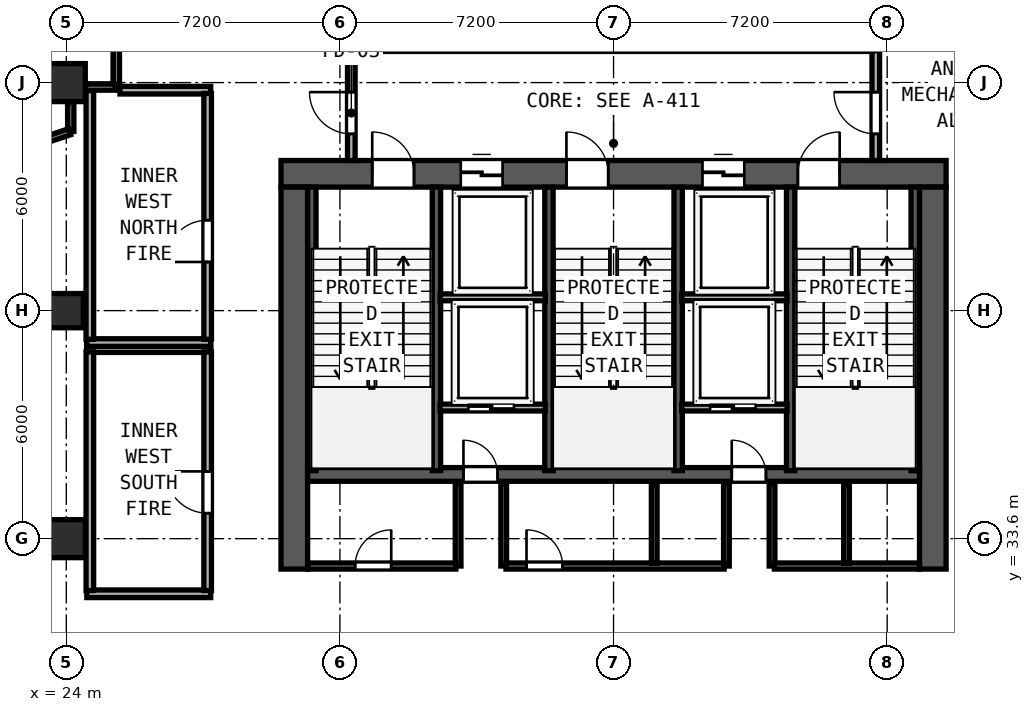
"""IFC4 building model, lengths in metres.
Left out: names, types, materials, properties, quantities, classifications, styles, units other than length and angle.
Written with IfcOpenShell. Run it as: python <this file> out.ifc"""

import sys

from ifc_helpers import new_model, si_unit, direction, frame, frame_2d, origin, origin_2d, place, context, subcontext, project, spatial, rectangle, hollow_rectangle, extrude, element, fill, save


model = new_model("IFC4")
c1 = context("Model", 3, precision=1e-05, world=origin(), true_north=direction((0.0, 1.0)))
c2 = subcontext(c1, "Body", "Model", "MODEL_VIEW")
j1 = project(units=[si_unit("LENGTHUNIT", "METRE"), si_unit("PLANEANGLEUNIT", "RADIAN")], contexts=[c1])
p1 = place(None, origin())
s1 = spatial("IfcSite", under=j1, at=p1, CompositionType="ELEMENT")
p2 = place(p1, origin())
s2 = spatial("IfcBuilding", under=s1, at=p2, CompositionType="ELEMENT")
p3 = place(p2, frame((0.0, 0.0, 136.4)))
s3 = spatial("IfcBuildingStorey", under=s2, at=p3, CompositionType="ELEMENT", Elevation=136.4)
p4 = place(p3, frame((29.65, 43.2, 0.0), z_axis=(0.0, 0.0, 1.0), x_axis=(1.0, 0.0, 0.0)))
e1 = element("IfcWall", 1, at=p4, inside=s3, PredefinedType="SHEAR", context=c2, shape_type="SweptSolid", body=[
    extrude(rectangle(XDim=17.5, YDim=0.7, at=frame_2d((8.75, 0.0))), origin(), (0.0, 0.0, 1.0), 4.4),
])
p5 = place(p4, frame((2.4, 0.0, 0.0)))
e2 = element("IfcOpeningElement", 2, at=p5, cuts=e1, PredefinedType="OPENING", context=c2, shape_type="SweptSolid", body=[
    extrude(rectangle(XDim=1.1, YDim=2.15, at=frame_2d((0.55, 1.075))), frame((0.0, 0.36, 0.0), z_axis=(0.0, -1.0, 0.0), x_axis=(1.0, 0.0, 0.0)), (0.0, 0.0, 1.0), 0.72),
])
p6 = place(p4, frame((7.51, 0.0, 0.0)))
e3 = element("IfcOpeningElement", 3, at=p6, cuts=e1, PredefinedType="OPENING", context=c2, shape_type="SweptSolid", body=[
    extrude(rectangle(XDim=1.1, YDim=2.15, at=frame_2d((0.55, 1.075))), frame((0.0, 0.36, 0.0), z_axis=(0.0, -1.0, 0.0), x_axis=(1.0, 0.0, 0.0)), (0.0, 0.0, 1.0), 0.72),
])
p7 = place(p4, frame((13.6, 0.0, 0.0)))
e4 = element("IfcOpeningElement", 4, at=p7, cuts=e1, PredefinedType="OPENING", context=c2, shape_type="SweptSolid", body=[
    extrude(rectangle(XDim=1.1, YDim=2.15, at=frame_2d((0.55, 1.075))), frame((0.0, 0.36, 0.0), z_axis=(0.0, -1.0, 0.0), x_axis=(1.0, 0.0, 0.0)), (0.0, 0.0, 1.0), 0.72),
])
p8 = place(p4, frame((4.73, 0.0, 0.0)))
e5 = element("IfcOpeningElement", 5, at=p8, cuts=e1, PredefinedType="OPENING", context=c2, shape_type="SweptSolid", body=[
    extrude(rectangle(XDim=1.1, YDim=2.2, at=frame_2d((0.55, 1.1))), frame((0.0, 0.36, 0.0), z_axis=(0.0, -1.0, 0.0), x_axis=(1.0, 0.0, 0.0)), (0.0, 0.0, 1.0), 0.72),
])
p9 = place(p4, frame((11.09, 0.0, 0.0)))
e6 = element("IfcOpeningElement", 6, at=p9, cuts=e1, PredefinedType="OPENING", context=c2, shape_type="SweptSolid", body=[
    extrude(rectangle(XDim=1.1, YDim=2.2, at=frame_2d((0.55, 1.1))), frame((0.0, 0.36, 0.0), z_axis=(0.0, -1.0, 0.0), x_axis=(1.0, 0.0, 0.0)), (0.0, 0.0, 1.0), 0.72),
])
for number, where, z_axis, x_axis in (
    (7, (30.0, 32.8, 0.0), (0.0, 0.0, 1.0), (0.0, 1.0, 0.0)),
    (8, (46.8, 32.8, 0.0), (0.0, 0.0, 1.0), (0.0, 1.0, 0.0)),
):
    element("IfcWall", number, at=place(p3, frame(where, z_axis=z_axis, x_axis=x_axis)), inside=s3, PredefinedType="SHEAR", context=c2, shape_type="SweptSolid", body=[
        extrude(rectangle(XDim=10.05, YDim=0.7, at=frame_2d((5.025, 0.0))), origin(), (0.0, 0.0, 1.0), 4.4),
    ])
p10 = place(p3, frame((30.35, 35.29, 0.0), z_axis=(0.0, 0.0, 1.0), x_axis=(1.0, 0.0, 0.0)))
e9 = element("IfcWall", 9, at=p10, inside=s3, PredefinedType="SHEAR", context=c2, shape_type="SweptSolid", body=[
    extrude(rectangle(XDim=16.1, YDim=0.36, at=frame_2d((8.05, 0.0))), origin(), (0.0, 0.0, 1.0), 4.4),
])
p11 = place(p10, frame((5.0, 0.0, 0.0), z_axis=(0.0, 0.0, 1.0), x_axis=(-1.0, 0.0, 0.0)))
e10 = element("IfcOpeningElement", 10, at=p11, cuts=e9, PredefinedType="OPENING", context=c2, shape_type="SweptSolid", body=[
    extrude(rectangle(XDim=0.9, YDim=2.1, at=frame_2d((0.45, 1.05))), frame((0.0, 0.19, 0.0), z_axis=(0.0, -1.0, 0.0), x_axis=(1.0, 0.0, 0.0)), (0.0, 0.0, 1.0), 0.38),
])
p12 = place(p10, frame((12.06, 0.0, 0.0), z_axis=(0.0, 0.0, 1.0), x_axis=(-1.0, 0.0, 0.0)))
e11 = element("IfcOpeningElement", 11, at=p12, cuts=e9, PredefinedType="OPENING", context=c2, shape_type="SweptSolid", body=[
    extrude(rectangle(XDim=0.9, YDim=2.1, at=frame_2d((0.45, 1.05))), frame((0.0, 0.19, 0.0), z_axis=(0.0, -1.0, 0.0), x_axis=(1.0, 0.0, 0.0)), (0.0, 0.0, 1.0), 0.38),
])
for number, where, z_axis, x_axis in (
    (12, (30.462, 35.39, 0.0), (0.0, 0.0, 1.0), (0.0, 1.0, 0.0)),
    (13, (33.74, 35.39, 0.0), (0.0, 0.0, 1.0), (0.0, 1.0, 0.0)),
    (14, (36.7, 35.39, 0.0), (0.0, 0.0, 1.0), (0.0, 1.0, 0.0)),
    (15, (40.1, 35.39, 0.0), (0.0, 0.0, 1.0), (0.0, 1.0, 0.0)),
    (16, (43.06, 35.39, 0.0), (0.0, 0.0, 1.0), (0.0, 1.0, 0.0)),
    (17, (46.338, 35.39, 0.0), (0.0, 0.0, 1.0), (0.0, 1.0, 0.0)),
):
    element("IfcWall", number, at=place(p3, frame(where, z_axis=z_axis, x_axis=x_axis)), inside=s3, PredefinedType="SHEAR", context=c2, shape_type="SweptSolid", body=[
        extrude(rectangle(XDim=7.46, YDim=0.22, at=frame_2d((3.73, 0.0))), origin(), (0.0, 0.0, 1.0), 4.4),
    ])
for number, where, z_axis, x_axis in (
    (18, (24.0, 33.6, 0.0), (0.0, 0.0, 1.0), (1.0, 0.0, 0.0)),
    (19, (24.0, 45.6, 0.0), (0.0, 0.0, 1.0), (1.0, 0.0, 0.0)),
):
    element("IfcColumn", number, at=place(p3, frame(where, z_axis=z_axis, x_axis=x_axis)), inside=s3, PredefinedType="COLUMN", context=c2, shape_type="SweptSolid", body=[
        extrude(hollow_rectangle(XDim=1.0, YDim=1.0, WallThickness=0.038, at=origin_2d()), origin(), (0.0, 0.0, 1.0), 4.6),
    ])
p13 = place(p3, frame((24.0, 39.6, 0.0), z_axis=(0.0, 0.0, 1.0), x_axis=(1.0, 0.0, 0.0)))
e20 = element("IfcColumn", 20, at=p13, inside=s3, PredefinedType="COLUMN", context=c2, shape_type="SweptSolid", body=[
    extrude(hollow_rectangle(XDim=0.9, YDim=0.9, WallThickness=0.034, at=origin_2d()), origin(), (0.0, 0.0, 1.0), 4.6),
])
p14 = place(p3, frame((25.32, 46.65, 0.0), z_axis=(0.0, 0.0, 1.0), x_axis=(0.0, -1.0, 0.0)))
e21 = element("IfcWall", 21, at=p14, inside=s3, PredefinedType="PARAPET", context=c2, shape_type="SweptSolid", body=[
    extrude(rectangle(XDim=1.17, YDim=0.16, at=frame_2d((0.585, 0.0))), origin(), (0.0, 0.0, 1.0), 1.15),
])
p15 = place(p3, frame((25.29, 45.48, 0.0), z_axis=(0.0, 0.0, 1.0), x_axis=(-1.0, 0.0, 0.0)))
e22 = element("IfcWall", 22, at=p15, inside=s3, PredefinedType="PARAPET", context=c2, shape_type="SweptSolid", body=[
    extrude(rectangle(XDim=0.798, YDim=0.16, at=frame_2d((0.399, 0.0))), origin(), (0.0, 0.0, 1.0), 1.15),
])
p16 = place(p3, frame((24.12, 45.108, 0.0), z_axis=(0.0, 0.0, 1.0), x_axis=(0.0, -1.0, 0.0)))
e23 = element("IfcWall", 23, at=p16, inside=s3, PredefinedType="PARAPET", context=c2, shape_type="SweptSolid", body=[
    extrude(rectangle(XDim=0.794, YDim=0.16, at=frame_2d((0.397, 0.0))), origin(), (0.0, 0.0, 1.0), 1.15),
])
p17 = place(p3, frame((24.092, 44.304, 0.0), z_axis=(0.0, 0.0, 1.0), x_axis=(-0.948683298051, -0.316227766017, 0.0)))
e24 = element("IfcWall", 24, at=p17, inside=s3, PredefinedType="PARAPET", context=c2, shape_type="SweptSolid", body=[
    extrude(rectangle(XDim=5.888, YDim=0.16, at=frame_2d((2.944, 0.0))), origin(), (0.0, 0.0, 1.0), 1.15),
])
p18 = place(p3, frame((31.5, 43.55, 0.0), z_axis=(0.0, 0.0, 1.0), x_axis=(0.0, 1.0, 0.0)))
e25 = element("IfcWall", 25, at=p18, inside=s3, PredefinedType="SOLIDWALL", context=c2, shape_type="SweptSolid", body=[
    extrude(rectangle(XDim=2.885, YDim=0.2, at=frame_2d((1.442, 0.0))), origin(), (0.0, 0.0, 1.0), 4.4),
])
p19 = place(p18, frame((1.8, 0.0, 0.0), z_axis=(0.0, 0.0, 1.0), x_axis=(-1.0, 0.0, 0.0)))
e26 = element("IfcOpeningElement", 26, at=p19, cuts=e25, PredefinedType="OPENING", context=c2, shape_type="SweptSolid", body=[
    extrude(rectangle(XDim=1.1, YDim=2.15, at=frame_2d((0.55, 1.075))), frame((0.0, 0.11, 0.0), z_axis=(0.0, -1.0, 0.0), x_axis=(1.0, 0.0, 0.0)), (0.0, 0.0, 1.0), 0.22),
])
p20 = place(p3, frame((45.3, 43.55, 0.0), z_axis=(0.0, 0.0, 1.0), x_axis=(0.0, 1.0, 0.0)))
e27 = element("IfcWall", 27, at=p20, inside=s3, PredefinedType="SOLIDWALL", context=c2, shape_type="SweptSolid", body=[
    extrude(rectangle(XDim=2.885, YDim=0.2, at=frame_2d((1.442, 0.0))), origin(), (0.0, 0.0, 1.0), 4.4),
])
p21 = place(p20, frame((0.7, 0.0, 0.0)))
e28 = element("IfcOpeningElement", 28, at=p21, cuts=e27, PredefinedType="OPENING", context=c2, shape_type="SweptSolid", body=[
    extrude(rectangle(XDim=1.1, YDim=2.15, at=frame_2d((0.55, 1.075))), frame((0.0, 0.11, 0.0), z_axis=(0.0, -1.0, 0.0), x_axis=(1.0, 0.0, 0.0)), (0.0, 0.0, 1.0), 0.22),
])
for number, where, z_axis, x_axis in (
    (29, (33.835, 39.95, 0.0), (0.0, 0.0, 1.0), (1.0, 0.0, 0.0)),
    (30, (40.195, 39.95, 0.0), (0.0, 0.0, 1.0), (1.0, 0.0, 0.0)),
):
    element("IfcWall", number, at=place(p3, frame(where, z_axis=z_axis, x_axis=x_axis)), inside=s3, PredefinedType="SOLIDWALL", context=c2, shape_type="SweptSolid", body=[
        extrude(rectangle(XDim=2.77, YDim=0.18, at=frame_2d((1.385, 0.0))), origin(), (0.0, 0.0, 1.0), 4.4),
    ])
p22 = place(p3, frame((33.835, 37.05, 0.0), z_axis=(0.0, 0.0, 1.0), x_axis=(1.0, 0.0, 0.0)))
e31 = element("IfcWall", 31, at=p22, inside=s3, PredefinedType="SOLIDWALL", context=c2, shape_type="SweptSolid", body=[
    extrude(rectangle(XDim=2.77, YDim=0.18, at=frame_2d((1.385, 0.0))), origin(), (0.0, 0.0, 1.0), 4.4),
])
p23 = place(p22, frame((1.945, 0.0, 0.0), z_axis=(0.0, 0.0, 1.0), x_axis=(-1.0, 0.0, 0.0)))
e32 = element("IfcOpeningElement", 32, at=p23, cuts=e31, PredefinedType="OPENING", context=c2, shape_type="SweptSolid", body=[
    extrude(rectangle(XDim=1.2, YDim=2.2, at=frame_2d((0.6, 1.1))), frame((0.0, 0.1, 0.0), z_axis=(0.0, -1.0, 0.0), x_axis=(1.0, 0.0, 0.0)), (0.0, 0.0, 1.0), 0.2),
])
for number, where, z_axis, x_axis in (
    (33, (34.31, 32.88, 0.0), (0.0, 0.0, 1.0), (0.0, 1.0, 0.0)),
    (34, (35.51, 32.88, 0.0), (0.0, 0.0, 1.0), (0.0, 1.0, 0.0)),
):
    element("IfcWall", number, at=place(p3, frame(where, z_axis=z_axis, x_axis=x_axis)), inside=s3, PredefinedType="SOLIDWALL", context=c2, shape_type="SweptSolid", body=[
        extrude(rectangle(XDim=2.17, YDim=0.15, at=frame_2d((1.085, 0.0))), origin(), (0.0, 0.0, 1.0), 4.4),
    ])
p24 = place(p3, frame((40.195, 37.05, 0.0), z_axis=(0.0, 0.0, 1.0), x_axis=(1.0, 0.0, 0.0)))
e35 = element("IfcWall", 35, at=p24, inside=s3, PredefinedType="SOLIDWALL", context=c2, shape_type="SweptSolid", body=[
    extrude(rectangle(XDim=2.77, YDim=0.18, at=frame_2d((1.385, 0.0))), origin(), (0.0, 0.0, 1.0), 4.4),
])
p25 = place(p24, frame((1.945, 0.0, 0.0), z_axis=(0.0, 0.0, 1.0), x_axis=(-1.0, 0.0, 0.0)))
e36 = element("IfcOpeningElement", 36, at=p25, cuts=e35, PredefinedType="OPENING", context=c2, shape_type="SweptSolid", body=[
    extrude(rectangle(XDim=1.2, YDim=2.2, at=frame_2d((0.6, 1.1))), frame((0.0, 0.1, 0.0), z_axis=(0.0, -1.0, 0.0), x_axis=(1.0, 0.0, 0.0)), (0.0, 0.0, 1.0), 0.2),
])
for number, where, z_axis, x_axis in (
    (37, (41.37, 32.88, 0.0), (0.0, 0.0, 1.0), (0.0, 1.0, 0.0)),
    (38, (42.57, 32.88, 0.0), (0.0, 0.0, 1.0), (0.0, 1.0, 0.0)),
):
    element("IfcWall", number, at=place(p3, frame(where, z_axis=z_axis, x_axis=x_axis)), inside=s3, PredefinedType="SOLIDWALL", context=c2, shape_type="SweptSolid", body=[
        extrude(rectangle(XDim=2.17, YDim=0.15, at=frame_2d((1.085, 0.0))), origin(), (0.0, 0.0, 1.0), 4.4),
    ])
p26 = place(p3, frame((30.35, 32.88, 0.0), z_axis=(0.0, 0.0, 1.0), x_axis=(1.0, 0.0, 0.0)))
e39 = element("IfcWall", 39, at=p26, inside=s3, PredefinedType="SOLIDWALL", context=c2, shape_type="SweptSolid", body=[
    extrude(rectangle(XDim=3.9, YDim=0.16, at=frame_2d((1.95, 0.0))), origin(), (0.0, 0.0, 1.0), 4.4),
])
p27 = place(p26, frame((2.2, 0.0, 0.0), z_axis=(0.0, 0.0, 1.0), x_axis=(-1.0, 0.0, 0.0)))
e40 = element("IfcOpeningElement", 40, at=p27, cuts=e39, PredefinedType="OPENING", context=c2, shape_type="SweptSolid", body=[
    extrude(rectangle(XDim=0.95, YDim=2.12, at=frame_2d((0.475, 1.06))), frame((0.0, 0.09, 0.0), z_axis=(0.0, -1.0, 0.0), x_axis=(1.0, 0.0, 0.0)), (0.0, 0.0, 1.0), 0.18),
])
p28 = place(p3, frame((35.57, 32.88, 0.0), z_axis=(0.0, 0.0, 1.0), x_axis=(1.0, 0.0, 0.0)))
e41 = element("IfcWall", 41, at=p28, inside=s3, PredefinedType="SOLIDWALL", context=c2, shape_type="SweptSolid", body=[
    extrude(rectangle(XDim=5.74, YDim=0.16, at=frame_2d((2.87, 0.0))), origin(), (0.0, 0.0, 1.0), 4.4),
])
p29 = place(p28, frame((1.49, 0.0, 0.0), z_axis=(0.0, 0.0, 1.0), x_axis=(-1.0, 0.0, 0.0)))
e42 = element("IfcOpeningElement", 42, at=p29, cuts=e41, PredefinedType="OPENING", context=c2, shape_type="SweptSolid", body=[
    extrude(rectangle(XDim=0.95, YDim=2.12, at=frame_2d((0.475, 1.06))), frame((0.0, 0.09, 0.0), z_axis=(0.0, -1.0, 0.0), x_axis=(1.0, 0.0, 0.0)), (0.0, 0.0, 1.0), 0.18),
])
p30 = place(p3, frame((42.63, 32.88, 0.0), z_axis=(0.0, 0.0, 1.0), x_axis=(1.0, 0.0, 0.0)))
e43 = element("IfcWall", 43, at=p30, inside=s3, PredefinedType="SOLIDWALL", context=c2, shape_type="SweptSolid", body=[
    extrude(rectangle(XDim=3.82, YDim=0.16, at=frame_2d((1.91, 0.0))), origin(), (0.0, 0.0, 1.0), 4.4),
])
for number, where, z_axis, x_axis in (
    (44, (39.47, 32.95, 0.0), (0.0, 0.0, 1.0), (0.0, 1.0, 0.0)),
    (45, (44.53, 32.95, 0.0), (0.0, 0.0, 1.0), (0.0, 1.0, 0.0)),
):
    element("IfcWall", number, at=place(p3, frame(where, z_axis=z_axis, x_axis=x_axis)), inside=s3, PredefinedType="SOLIDWALL", context=c2, shape_type="SweptSolid", body=[
        extrude(rectangle(XDim=2.05, YDim=0.15, at=frame_2d((1.025, 0.0))), origin(), (0.0, 0.0, 1.0), 4.4),
    ])
for number, where, z_axis, x_axis in (
    (46, (24.54, 38.6, 0.0), (0.0, 0.0, 1.0), (1.0, 0.0, 0.0)),
    (47, (24.54, 32.15, 0.0), (0.0, 0.0, 1.0), (1.0, 0.0, 0.0)),
):
    element("IfcWall", number, at=place(p3, frame(where, z_axis=z_axis, x_axis=x_axis)), inside=s3, PredefinedType="SOLIDWALL", context=c2, shape_type="SweptSolid", body=[
        extrude(rectangle(XDim=3.26, YDim=0.2, at=frame_2d((1.63, 0.0))), origin(), (0.0, 0.0, 1.0), 4.4),
    ])
p31 = place(p3, frame((24.62, 32.235, 0.0), z_axis=(0.0, 0.0, 1.0), x_axis=(0.0, 1.0, 0.0)))
e48 = element("IfcWall", 48, at=p31, inside=s3, PredefinedType="SOLIDWALL", context=c2, shape_type="SweptSolid", body=[
    extrude(rectangle(XDim=6.28, YDim=0.2, at=frame_2d((3.14, 0.0))), origin(), (0.0, 0.0, 1.0), 4.4),
])
p32 = place(p3, frame((27.72, 32.235, 0.0), z_axis=(0.0, 0.0, 1.0), x_axis=(0.0, 1.0, 0.0)))
e49 = element("IfcWall", 49, at=p32, inside=s3, PredefinedType="SOLIDWALL", context=c2, shape_type="SweptSolid", body=[
    extrude(rectangle(XDim=6.28, YDim=0.2, at=frame_2d((3.14, 0.0))), origin(), (0.0, 0.0, 1.0), 4.4),
])
p33 = place(p32, frame((3.135, 0.0, 0.0), z_axis=(0.0, 0.0, 1.0), x_axis=(-1.0, 0.0, 0.0)))
e50 = element("IfcOpeningElement", 50, at=p33, cuts=e49, PredefinedType="OPENING", context=c2, shape_type="SweptSolid", body=[
    extrude(rectangle(XDim=1.1, YDim=2.15, at=frame_2d((0.55, 1.075))), frame((0.0, 0.11, 0.0), z_axis=(0.0, -1.0, 0.0), x_axis=(1.0, 0.0, 0.0)), (0.0, 0.0, 1.0), 0.22),
])
p34 = place(p3, frame((25.412, 45.4, 0.0), z_axis=(0.0, 0.0, 1.0), x_axis=(1.0, 0.0, 0.0)))
e51 = element("IfcWall", 51, at=p34, inside=s3, PredefinedType="SOLIDWALL", context=c2, shape_type="SweptSolid", body=[
    extrude(rectangle(XDim=2.388, YDim=0.2, at=frame_2d((1.194, 0.0))), origin(), (0.0, 0.0, 1.0), 4.4),
])
p35 = place(p3, frame((24.54, 38.76, 0.0), z_axis=(0.0, 0.0, 1.0), x_axis=(1.0, 0.0, 0.0)))
e52 = element("IfcWall", 52, at=p35, inside=s3, PredefinedType="SOLIDWALL", context=c2, shape_type="SweptSolid", body=[
    extrude(rectangle(XDim=3.26, YDim=0.2, at=frame_2d((1.63, 0.0))), origin(), (0.0, 0.0, 1.0), 4.4),
])
p36 = place(p3, frame((24.62, 38.845, 0.0), z_axis=(0.0, 0.0, 1.0), x_axis=(0.0, 1.0, 0.0)))
e53 = element("IfcWall", 53, at=p36, inside=s3, PredefinedType="SOLIDWALL", context=c2, shape_type="SweptSolid", body=[
    extrude(rectangle(XDim=6.543, YDim=0.2, at=frame_2d((3.271, 0.0))), origin(), (0.0, 0.0, 1.0), 4.4),
])
p37 = place(p3, frame((27.72, 38.845, 0.0), z_axis=(0.0, 0.0, 1.0), x_axis=(0.0, 1.0, 0.0)))
e54 = element("IfcWall", 54, at=p37, inside=s3, PredefinedType="SOLIDWALL", context=c2, shape_type="SweptSolid", body=[
    extrude(rectangle(XDim=6.47, YDim=0.2, at=frame_2d((3.235, 0.0))), origin(), (0.0, 0.0, 1.0), 4.4),
])
p38 = place(p37, frame((3.135, 0.0, 0.0), z_axis=(0.0, 0.0, 1.0), x_axis=(-1.0, 0.0, 0.0)))
e55 = element("IfcOpeningElement", 55, at=p38, cuts=e54, PredefinedType="OPENING", context=c2, shape_type="SweptSolid", body=[
    extrude(rectangle(XDim=1.1, YDim=2.15, at=frame_2d((0.55, 1.075))), frame((0.0, 0.11, 0.0), z_axis=(0.0, -1.0, 0.0), x_axis=(1.0, 0.0, 0.0)), (0.0, 0.0, 1.0), 0.22),
])
p39 = place(p5, origin())
e56 = element("IfcDoor", 56, at=p39, inside=s3, OperationType="SINGLE_SWING_LEFT", PredefinedType="DOOR", context=c2, shape_type="SweptSolid", body=[
    extrude(rectangle(XDim=1.1, YDim=2.15, at=frame_2d((0.55, 1.075))), frame((0.0, 0.185, 0.0), z_axis=(0.0, -1.0, 0.0), x_axis=(1.0, 0.0, 0.0)), (0.0, 0.0, 1.0), 0.05),
])
fill(e2, e56)
p40 = place(p6, origin())
e57 = element("IfcDoor", 57, at=p40, inside=s3, OperationType="SINGLE_SWING_LEFT", PredefinedType="DOOR", context=c2, shape_type="SweptSolid", body=[
    extrude(rectangle(XDim=1.1, YDim=2.15, at=frame_2d((0.55, 1.075))), frame((0.0, 0.185, 0.0), z_axis=(0.0, -1.0, 0.0), x_axis=(1.0, 0.0, 0.0)), (0.0, 0.0, 1.0), 0.05),
])
fill(e3, e57)
p41 = place(p7, origin())
e58 = element("IfcDoor", 58, at=p41, inside=s3, OperationType="SINGLE_SWING_RIGHT", PredefinedType="DOOR", context=c2, shape_type="SweptSolid", body=[
    extrude(rectangle(XDim=1.1, YDim=2.15, at=frame_2d((0.55, 1.075))), frame((0.0, 0.185, 0.0), z_axis=(0.0, -1.0, 0.0), x_axis=(1.0, 0.0, 0.0)), (0.0, 0.0, 1.0), 0.05),
])
fill(e4, e58)
p42 = place(p19, origin())
e59 = element("IfcDoor", 59, at=p42, inside=s3, OperationType="SINGLE_SWING_LEFT", PredefinedType="DOOR", context=c2, shape_type="SweptSolid", body=[
    extrude(rectangle(XDim=1.1, YDim=2.15, at=frame_2d((0.55, 1.075))), frame((0.0, 0.025, 0.0), z_axis=(0.0, -1.0, 0.0), x_axis=(1.0, 0.0, 0.0)), (0.0, 0.0, 1.0), 0.05),
])
fill(e26, e59)
p43 = place(p21, origin())
e60 = element("IfcDoor", 60, at=p43, inside=s3, OperationType="SINGLE_SWING_RIGHT", PredefinedType="DOOR", context=c2, shape_type="SweptSolid", body=[
    extrude(rectangle(XDim=1.1, YDim=2.15, at=frame_2d((0.55, 1.075))), frame((0.0, 0.025, 0.0), z_axis=(0.0, -1.0, 0.0), x_axis=(1.0, 0.0, 0.0)), (0.0, 0.0, 1.0), 0.05),
])
fill(e28, e60)
p44 = place(p8, origin())
e61 = element("IfcDoor", 61, at=p44, inside=s3, OperationType="SLIDING_TO_LEFT", PredefinedType="DOOR", context=c2, shape_type="SweptSolid", body=[
    extrude(rectangle(XDim=1.1, YDim=2.2, at=frame_2d((0.55, 1.1))), frame((0.0, 0.185, 0.0), z_axis=(0.0, -1.0, 0.0), x_axis=(1.0, 0.0, 0.0)), (0.0, 0.0, 1.0), 0.05),
])
fill(e5, e61)
p45 = place(p9, origin())
e62 = element("IfcDoor", 62, at=p45, inside=s3, OperationType="SLIDING_TO_LEFT", PredefinedType="DOOR", context=c2, shape_type="SweptSolid", body=[
    extrude(rectangle(XDim=1.1, YDim=2.2, at=frame_2d((0.55, 1.1))), frame((0.0, 0.185, 0.0), z_axis=(0.0, -1.0, 0.0), x_axis=(1.0, 0.0, 0.0)), (0.0, 0.0, 1.0), 0.05),
])
fill(e6, e62)
p46 = place(p23, origin())
e63 = element("IfcDoor", 63, at=p46, inside=s3, OperationType="SLIDING_TO_RIGHT", PredefinedType="DOOR", context=c2, shape_type="SweptSolid", body=[
    extrude(rectangle(XDim=1.2, YDim=2.2, at=frame_2d((0.6, 1.1))), frame((0.0, 0.025, 0.0), z_axis=(0.0, -1.0, 0.0), x_axis=(1.0, 0.0, 0.0)), (0.0, 0.0, 1.0), 0.05),
])
fill(e32, e63)
p47 = place(p11, origin())
e64 = element("IfcDoor", 64, at=p47, inside=s3, OperationType="SINGLE_SWING_RIGHT", PredefinedType="DOOR", context=c2, shape_type="SweptSolid", body=[
    extrude(rectangle(XDim=0.9, YDim=2.1, at=frame_2d((0.45, 1.05))), frame((0.0, 0.025, 0.0), z_axis=(0.0, -1.0, 0.0), x_axis=(1.0, 0.0, 0.0)), (0.0, 0.0, 1.0), 0.05),
])
fill(e10, e64)
p48 = place(p25, origin())
e65 = element("IfcDoor", 65, at=p48, inside=s3, OperationType="SLIDING_TO_RIGHT", PredefinedType="DOOR", context=c2, shape_type="SweptSolid", body=[
    extrude(rectangle(XDim=1.2, YDim=2.2, at=frame_2d((0.6, 1.1))), frame((0.0, 0.025, 0.0), z_axis=(0.0, -1.0, 0.0), x_axis=(1.0, 0.0, 0.0)), (0.0, 0.0, 1.0), 0.05),
])
fill(e36, e65)
p49 = place(p12, origin())
e66 = element("IfcDoor", 66, at=p49, inside=s3, OperationType="SINGLE_SWING_RIGHT", PredefinedType="DOOR", context=c2, shape_type="SweptSolid", body=[
    extrude(rectangle(XDim=0.9, YDim=2.1, at=frame_2d((0.45, 1.05))), frame((0.0, 0.025, 0.0), z_axis=(0.0, -1.0, 0.0), x_axis=(1.0, 0.0, 0.0)), (0.0, 0.0, 1.0), 0.05),
])
fill(e11, e66)
p50 = place(p27, origin())
e67 = element("IfcDoor", 67, at=p50, inside=s3, OperationType="SINGLE_SWING_LEFT", PredefinedType="DOOR", context=c2, shape_type="SweptSolid", body=[
    extrude(rectangle(XDim=0.95, YDim=2.12, at=frame_2d((0.475, 1.06))), frame((0.0, 0.025, 0.0), z_axis=(0.0, -1.0, 0.0), x_axis=(1.0, 0.0, 0.0)), (0.0, 0.0, 1.0), 0.05),
])
fill(e40, e67)
p51 = place(p29, origin())
e68 = element("IfcDoor", 68, at=p51, inside=s3, OperationType="SINGLE_SWING_RIGHT", PredefinedType="DOOR", context=c2, shape_type="SweptSolid", body=[
    extrude(rectangle(XDim=0.95, YDim=2.12, at=frame_2d((0.475, 1.06))), frame((0.0, 0.025, 0.0), z_axis=(0.0, -1.0, 0.0), x_axis=(1.0, 0.0, 0.0)), (0.0, 0.0, 1.0), 0.05),
])
fill(e42, e68)
p52 = place(p33, origin())
e69 = element("IfcDoor", 69, at=p52, inside=s3, OperationType="SINGLE_SWING_LEFT", PredefinedType="DOOR", context=c2, shape_type="SweptSolid", body=[
    extrude(rectangle(XDim=1.1, YDim=2.15, at=frame_2d((0.55, 1.075))), frame((0.0, 0.025, 0.0), z_axis=(0.0, -1.0, 0.0), x_axis=(1.0, 0.0, 0.0)), (0.0, 0.0, 1.0), 0.05),
])
fill(e50, e69)
p53 = place(p38, origin())
e70 = element("IfcDoor", 70, at=p53, inside=s3, OperationType="SINGLE_SWING_RIGHT", PredefinedType="DOOR", context=c2, shape_type="SweptSolid", body=[
    extrude(rectangle(XDim=1.1, YDim=2.15, at=frame_2d((0.55, 1.075))), frame((0.0, 0.025, 0.0), z_axis=(0.0, -1.0, 0.0), x_axis=(1.0, 0.0, 0.0)), (0.0, 0.0, 1.0), 0.05),
])
fill(e55, e70)
save(model, sys.argv[1])
